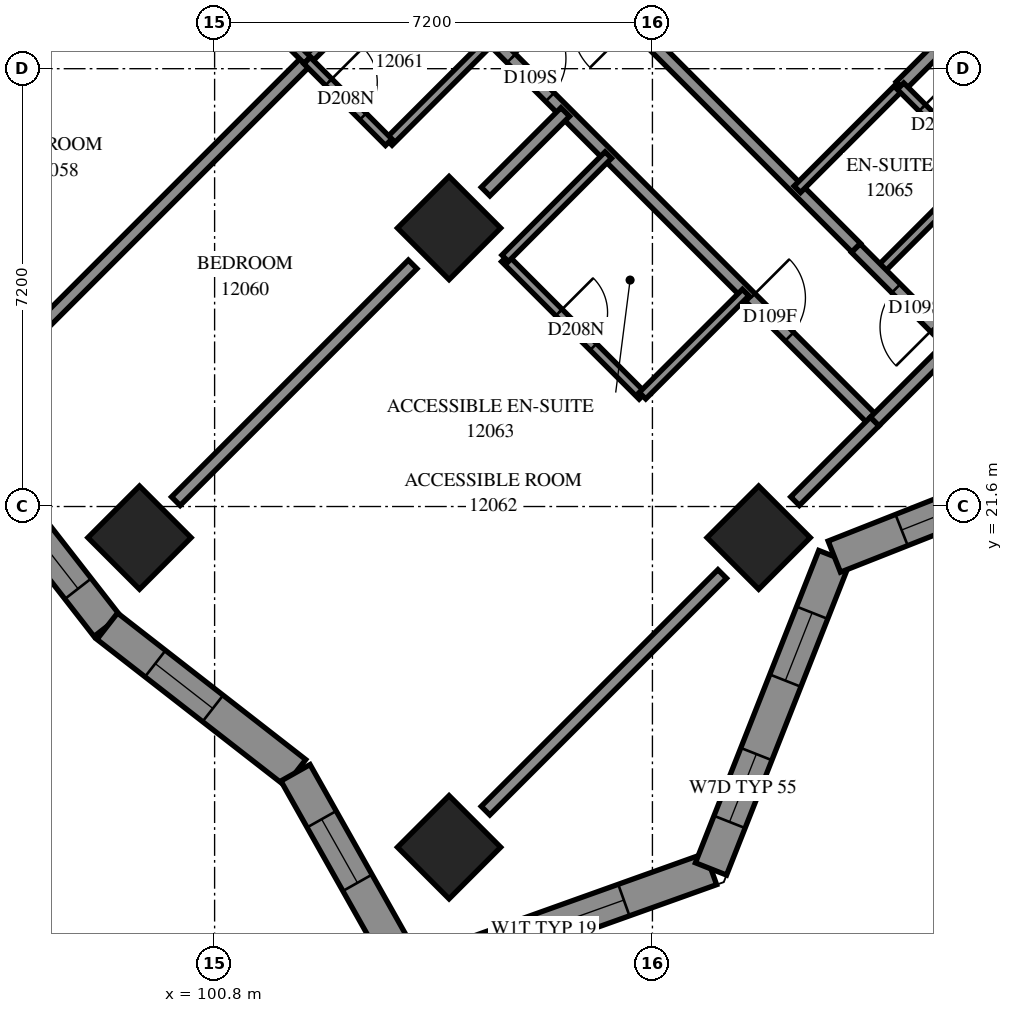
"""IFC4 building model, lengths in metres.
Left out: names, types, materials, properties, quantities, classifications, styles, units other than length and angle.
Written with IfcOpenShell. Run it as: python <this file> out.ifc"""

import sys

from ifc_helpers import new_model, si_unit, direction, frame, frame_2d, origin, origin_2d, place, context, subcontext, project, spatial, polyline, rectangle, outline, extrude, element, fill, save


model = new_model("IFC4")
c1 = context("Model", 3, precision=1e-05, world=origin(), true_north=direction((0.0, 1.0)))
c2 = subcontext(c1, "Body", "Model", "MODEL_VIEW")
j1 = project(units=[si_unit("LENGTHUNIT", "METRE"), si_unit("PLANEANGLEUNIT", "RADIAN")], contexts=[c1])
p1 = place(None, origin())
s1 = spatial("IfcSite", under=j1, at=p1, CompositionType="ELEMENT")
p2 = place(p1, origin())
s2 = spatial("IfcBuilding", under=s1, at=p2, CompositionType="ELEMENT")
p3 = place(p2, frame((0.0, 0.0, 47.4)))
s3 = spatial("IfcBuildingStorey", under=s2, at=p3, CompositionType="ELEMENT", Elevation=47.4)
for number, where, z_axis, x_axis in (
    (1, (104.656, 26.18, 0.0), (0.0, 0.0, 1.0), (0.707, -0.707, 0.0)),
    (2, (99.565, 21.088, 0.0), (0.0, 0.0, 1.0), (0.707, -0.707, 0.0)),
    (3, (109.747, 21.088, 0.0), (0.0, 0.0, 1.0), (0.707, -0.707, 0.0)),
    (4, (104.656, 15.997, 0.0), (0.0, 0.0, 1.0), (0.707, -0.707, 0.0)),
):
    element("IfcColumn", number, at=place(p3, frame(where, z_axis=z_axis, x_axis=x_axis)), inside=s3, PredefinedType="COLUMN", context=c2, shape_type="SweptSolid", body=[
        extrude(rectangle(XDim=1.2, YDim=1.2, at=origin_2d()), origin(), (0.0, 0.0, 1.0), 3.1),
    ])
p4 = place(p3, frame((104.016, 13.872, 0.0), z_axis=(0.0, 0.0, 1.0), x_axis=(0.9416441087, 0.3366101194, 0.0)))
e5 = element("IfcWall", 5, at=p4, inside=s3, PredefinedType="SOLIDWALL", context=c2, shape_type="SweptSolid", body=[
    extrude(outline(polyline([(-0.232, -0.275), (5.378, -0.275), (5.128, 0.275), (0.232, 0.275), (-0.232, -0.275)])), origin(), (0.0, 0.0, 1.0), 3.1),
])
p5 = place(p4, frame((0.931, 0.0, 0.5)))
e6 = element("IfcOpeningElement", 6, at=p5, cuts=e5, PredefinedType="OPENING", context=c2, shape_type="SweptSolid", body=[
    extrude(rectangle(XDim=2.8, YDim=2.45, at=frame_2d((1.4, 1.225))), frame((0.0, 0.285, 0.0), z_axis=(0.0, -1.0, 0.0), x_axis=(1.0, 0.0, 0.0)), (0.0, 0.0, 1.0), 0.57),
])
p6 = place(p3, frame((108.963, 15.64, 0.0), z_axis=(0.0, 0.0, 1.0), x_axis=(0.3672341559, 0.9301285259, 0.0)))
e7 = element("IfcWall", 7, at=p6, inside=s3, PredefinedType="SOLIDWALL", context=c2, shape_type="SweptSolid", body=[
    extrude(outline(polyline([(-0.125, -0.275), (5.402, -0.275), (5.641, 0.275), (0.125, 0.275), (-0.125, -0.275)])), origin(), (0.0, 0.0, 1.0), 3.1),
])
p7 = place(p6, frame((0.831, 0.0, 0.5)))
e8 = element("IfcOpeningElement", 8, at=p7, cuts=e7, PredefinedType="OPENING", context=c2, shape_type="SweptSolid", body=[
    extrude(rectangle(XDim=1.2, YDim=2.45, at=frame_2d((0.6, 1.225))), frame((0.0, 0.285, 0.0), z_axis=(0.0, -1.0, 0.0), x_axis=(1.0, 0.0, 0.0)), (0.0, 0.0, 1.0), 0.57),
])
p8 = place(p6, frame((3.329, 0.0, 0.5)))
e9 = element("IfcOpeningElement", 9, at=p8, cuts=e7, PredefinedType="OPENING", context=c2, shape_type="SweptSolid", body=[
    extrude(rectangle(XDim=1.2, YDim=2.45, at=frame_2d((0.6, 1.225))), frame((0.0, 0.285, 0.0), z_axis=(0.0, -1.0, 0.0), x_axis=(1.0, 0.0, 0.0)), (0.0, 0.0, 1.0), 0.57),
])
p9 = place(p3, frame((110.991, 20.776, 0.0), z_axis=(0.0, 0.0, 1.0), x_axis=(0.9301285259, 0.3672341559, 0.0)))
e10 = element("IfcWall", 10, at=p9, inside=s3, PredefinedType="SOLIDWALL", context=c2, shape_type="SweptSolid", body=[
    extrude(outline(polyline([(0.119, -0.275), (5.646, -0.275), (5.397, 0.275), (-0.119, 0.275), (0.119, -0.275)])), origin(), (0.0, 0.0, 1.0), 3.1),
])
p10 = place(p9, frame((1.19, 0.0, 0.5)))
e11 = element("IfcOpeningElement", 11, at=p10, cuts=e10, PredefinedType="OPENING", context=c2, shape_type="SweptSolid", body=[
    extrude(rectangle(XDim=2.8, YDim=2.45, at=frame_2d((1.4, 1.225))), frame((0.0, 0.285, 0.0), z_axis=(0.0, -1.0, 0.0), x_axis=(1.0, 0.0, 0.0)), (0.0, 0.0, 1.0), 0.57),
])
p11 = place(p3, frame((96.637, 22.711, 0.0), z_axis=(0.0, 0.0, 1.0), x_axis=(0.614334374, -0.7890458015, 0.0)))
e12 = element("IfcWall", 12, at=p11, inside=s3, PredefinedType="SOLIDWALL", context=c2, shape_type="SweptSolid", body=[
    extrude(outline(polyline([(0.034, -0.275), (3.937, -0.275), (3.868, 0.275), (-0.034, 0.275), (0.034, -0.275)])), origin(), (0.0, 0.0, 1.0), 3.1),
])
p12 = place(p11, frame((0.321, 0.0, 0.5)))
e13 = element("IfcOpeningElement", 13, at=p12, cuts=e12, PredefinedType="OPENING", context=c2, shape_type="SweptSolid", body=[
    extrude(rectangle(XDim=2.8, YDim=2.45, at=frame_2d((1.4, 1.225))), frame((0.0, 0.285, 0.0), z_axis=(0.0, -1.0, 0.0), x_axis=(1.0, 0.0, 0.0)), (0.0, 0.0, 1.0), 0.57),
])
p13 = place(p3, frame((99.034, 19.632, 0.0), z_axis=(0.0, 0.0, 1.0), x_axis=(0.7890391978, -0.6143428557, 0.0)))
e14 = element("IfcWall", 14, at=p13, inside=s3, PredefinedType="SOLIDWALL", context=c2, shape_type="SweptSolid", body=[
    extrude(outline(polyline([(-0.034, -0.275), (3.868, -0.275), (3.979, 0.275), (0.034, 0.275), (-0.034, -0.275)])), origin(), (0.0, 0.0, 1.0), 3.1),
])
p14 = place(p13, frame((1.001, 0.0, 0.5)))
e15 = element("IfcOpeningElement", 15, at=p14, cuts=e14, PredefinedType="OPENING", context=c2, shape_type="SweptSolid", body=[
    extrude(rectangle(XDim=1.2, YDim=2.45, at=frame_2d((0.6, 1.225))), frame((0.0, 0.285, 0.0), z_axis=(0.0, -1.0, 0.0), x_axis=(1.0, 0.0, 0.0)), (0.0, 0.0, 1.0), 0.57),
])
p15 = place(p3, frame((102.13, 17.221, 0.0), z_axis=(0.0, 0.0, 1.0), x_axis=(0.4907366579, -0.8713079436, 0.0)))
e16 = element("IfcWall", 16, at=p15, inside=s3, PredefinedType="SOLIDWALL", context=c2, shape_type="SweptSolid", body=[
    extrude(outline(polyline([(0.055, -0.275), (4.076, -0.275), (3.612, 0.275), (-0.055, 0.275), (0.055, -0.275)])), origin(), (0.0, 0.0, 1.0), 3.1),
])
p16 = place(p15, frame((0.877, 0.0, 0.5)))
e17 = element("IfcOpeningElement", 17, at=p16, cuts=e16, PredefinedType="OPENING", context=c2, shape_type="SweptSolid", body=[
    extrude(rectangle(XDim=1.2, YDim=2.45, at=frame_2d((0.6, 1.225))), frame((0.0, 0.285, 0.0), z_axis=(0.0, -1.0, 0.0), x_axis=(1.0, 0.0, 0.0)), (0.0, 0.0, 1.0), 0.57),
])
p17 = place(p3, frame((93.481, 41.167, 0.0), z_axis=(0.0, 0.0, 1.0), x_axis=(0.7071067812, -0.7071067812, 0.0)))
e18 = element("IfcWall", 18, at=p17, inside=s3, PredefinedType="PARTITIONING", context=c2, shape_type="SweptSolid", body=[
    extrude(rectangle(XDim=25.699, YDim=0.2, at=frame_2d((12.85, 0.0))), origin(), (0.0, 0.0, 1.0), 3.1),
])
p18 = place(p17, frame((2.8, 0.0, 0.0)))
e19 = element("IfcOpeningElement", 19, at=p18, cuts=e18, PredefinedType="OPENING", context=c2, shape_type="SweptSolid", body=[
    extrude(rectangle(XDim=0.9, YDim=2.1, at=frame_2d((0.45, 1.05))), frame((0.0, 0.11, 0.0), z_axis=(0.0, -1.0, 0.0), x_axis=(1.0, 0.0, 0.0)), (0.0, 0.0, 1.0), 0.22),
])
p19 = place(p17, frame((9.948, 0.0, 0.0)))
e20 = element("IfcOpeningElement", 20, at=p19, cuts=e18, PredefinedType="OPENING", context=c2, shape_type="SweptSolid", body=[
    extrude(rectangle(XDim=0.9, YDim=2.1, at=frame_2d((0.45, 1.05))), frame((0.0, 0.11, 0.0), z_axis=(0.0, -1.0, 0.0), x_axis=(1.0, 0.0, 0.0)), (0.0, 0.0, 1.0), 0.22),
])
p20 = place(p17, frame((11.7, 0.0, 0.0)))
e21 = element("IfcOpeningElement", 21, at=p20, cuts=e18, PredefinedType="OPENING", context=c2, shape_type="SweptSolid", body=[
    extrude(rectangle(XDim=0.9, YDim=2.1, at=frame_2d((0.45, 1.05))), frame((0.0, 0.11, 0.0), z_axis=(0.0, -1.0, 0.0), x_axis=(1.0, 0.0, 0.0)), (0.0, 0.0, 1.0), 0.22),
])
p21 = place(p17, frame((17.25, 0.0, 0.0)))
e22 = element("IfcOpeningElement", 22, at=p21, cuts=e18, PredefinedType="OPENING", context=c2, shape_type="SweptSolid", body=[
    extrude(rectangle(XDim=0.9, YDim=2.1, at=frame_2d((0.45, 1.05))), frame((0.0, 0.11, 0.0), z_axis=(0.0, -1.0, 0.0), x_axis=(1.0, 0.0, 0.0)), (0.0, 0.0, 1.0), 0.22),
])
p22 = place(p17, frame((22.82, 0.0, 0.0)))
e23 = element("IfcOpeningElement", 23, at=p22, cuts=e18, PredefinedType="OPENING", context=c2, shape_type="SweptSolid", body=[
    extrude(rectangle(XDim=0.9, YDim=2.1, at=frame_2d((0.45, 1.05))), frame((0.0, 0.11, 0.0), z_axis=(0.0, -1.0, 0.0), x_axis=(1.0, 0.0, 0.0)), (0.0, 0.0, 1.0), 0.22),
])
p23 = place(p3, frame((111.352, 25.855, 0.0), z_axis=(0.0, 0.0, 1.0), x_axis=(-0.7070418597, 0.7071716967, 0.0)))
e24 = element("IfcWall", 24, at=p23, inside=s3, PredefinedType="PARTITIONING", context=c2, shape_type="SweptSolid", body=[
    extrude(rectangle(XDim=13.864, YDim=0.2, at=frame_2d((6.932, 0.0))), origin(), (0.0, 0.0, 1.0), 3.1),
])
p24 = place(p23, frame((12.564, 0.0, 0.0)))
e25 = element("IfcOpeningElement", 25, at=p24, cuts=e24, PredefinedType="OPENING", context=c2, shape_type="SweptSolid", body=[
    extrude(rectangle(XDim=0.9, YDim=2.1, at=frame_2d((0.45, 1.05))), frame((0.0, 0.11, 0.0), z_axis=(0.0, -1.0, 0.0), x_axis=(1.0, 0.0, 0.0)), (0.0, 0.0, 1.0), 0.22),
])
p25 = place(p23, frame((5.19, 0.0, 0.0)))
e26 = element("IfcOpeningElement", 26, at=p25, cuts=e24, PredefinedType="OPENING", context=c2, shape_type="SweptSolid", body=[
    extrude(rectangle(XDim=1.0, YDim=2.1, at=frame_2d((0.5, 1.05))), frame((0.0, 0.11, 0.0), z_axis=(0.0, -1.0, 0.0), x_axis=(1.0, 0.0, 0.0)), (0.0, 0.0, 1.0), 0.22),
])
p26 = place(p3, frame((96.528, 23.144, 0.0), z_axis=(0.0, 0.0, 1.0), x_axis=(0.7071067812, 0.7071067812, 0.0)))
e27 = element("IfcWall", 27, at=p26, inside=s3, PredefinedType="PARTITIONING", context=c2, shape_type="SweptSolid", body=[
    extrude(rectangle(XDim=8.195, YDim=0.2, at=frame_2d((4.098, 0.0))), origin(), (0.0, 0.0, 1.0), 3.1),
])
p27 = place(p3, frame((100.162, 21.688, 0.0), z_axis=(0.0, 0.0, 1.0), x_axis=(0.7071067812, 0.7071067812, 0.0)))
e28 = element("IfcWall", 28, at=p27, inside=s3, PredefinedType="PARTITIONING", context=c2, shape_type="SweptSolid", body=[
    extrude(rectangle(XDim=5.507, YDim=0.2, at=frame_2d((2.753, 0.0))), origin(), (0.0, 0.0, 1.0), 3.1),
])
p28 = place(p3, frame((105.255, 16.599, 0.0), z_axis=(0.0, 0.0, 1.0), x_axis=(0.7071067812, 0.7071067812, 0.0)))
e29 = element("IfcWall", 29, at=p28, inside=s3, PredefinedType="PARTITIONING", context=c2, shape_type="SweptSolid", body=[
    extrude(rectangle(XDim=5.504, YDim=0.2, at=frame_2d((2.752, 0.0))), origin(), (0.0, 0.0, 1.0), 2.6),
])
p29 = place(p3, frame((95.073, 26.781, 0.0), z_axis=(0.0, 0.0, 1.0), x_axis=(0.7071067812, 0.7071067812, 0.0)))
e30 = element("IfcWall", 30, at=p29, inside=s3, PredefinedType="PARTITIONING", context=c2, shape_type="SweptSolid", body=[
    extrude(rectangle(XDim=5.501, YDim=0.2, at=frame_2d((2.751, 0.0))), origin(), (0.0, 0.0, 1.0), 3.1),
])
p30 = place(p3, frame((112.079, 28.513, 0.0), z_axis=(0.0, 0.0, 1.0), x_axis=(0.7071067812, 0.7071067812, 0.0)))
e31 = element("IfcWall", 31, at=p30, inside=s3, PredefinedType="PARTITIONING", context=c2, shape_type="SweptSolid", body=[
    extrude(rectangle(XDim=3.351, YDim=0.2, at=frame_2d((1.675, 0.0))), origin(), (0.0, 0.0, 1.0), 3.1),
])
p31 = place(p3, frame((105.573, 25.681, 0.0), z_axis=(0.0, 0.0, 1.0), x_axis=(0.7071067812, -0.7071067812, 0.0)))
e32 = element("IfcWall", 32, at=p31, inside=s3, PredefinedType="PARTITIONING", context=c2, shape_type="SweptSolid", body=[
    extrude(rectangle(XDim=3.199, YDim=0.15, at=frame_2d((1.599, 0.0))), origin(), (0.0, 0.0, 1.0), 3.1),
])
p32 = place(p31, frame((1.258, 0.0, 0.0)))
e33 = element("IfcOpeningElement", 33, at=p32, cuts=e32, PredefinedType="OPENING", context=c2, shape_type="SweptSolid", body=[
    extrude(rectangle(XDim=0.8, YDim=2.1, at=frame_2d((0.4, 1.05))), frame((0.0, 0.085, 0.0), z_axis=(0.0, -1.0, 0.0), x_axis=(1.0, 0.0, 0.0)), (0.0, 0.0, 1.0), 0.17),
])
p33 = place(p3, frame((111.725, 25.473, 0.0), z_axis=(0.0, 0.0, 1.0), x_axis=(0.7071067812, 0.7071067812, 0.0)))
e34 = element("IfcWall", 34, at=p33, inside=s3, PredefinedType="PARTITIONING", context=c2, shape_type="SweptSolid", body=[
    extrude(rectangle(XDim=2.401, YDim=0.15, at=frame_2d((1.201, 0.0))), origin(), (0.0, 0.0, 1.0), 3.1),
])
p34 = place(p3, frame((105.578, 25.682, 0.0), z_axis=(0.0, 0.0, 1.0), x_axis=(0.706689978, 0.7075233388, 0.0)))
e35 = element("IfcWall", 35, at=p34, inside=s3, PredefinedType="PARTITIONING", context=c2, shape_type="SweptSolid", body=[
    extrude(rectangle(XDim=2.4, YDim=0.15, at=frame_2d((1.2, 0.0))), origin(), (0.0, 0.0, 1.0), 3.1),
])
for number, where, z_axis, x_axis in (
    (36, (110.383, 26.817, 0.0), (0.0, 0.0, 1.0), (0.707, 0.707, 0.0)),
    (37, (102.323, 28.939, 0.0), (0.0, 0.0, 1.0), (0.707, 0.707, 0.0)),
    (38, (103.665, 27.595, 0.0), (0.0, 0.0, 1.0), (0.707, 0.707, 0.0)),
    (39, (107.837, 23.423, 0.0), (0.0, 0.0, 1.0), (0.707, 0.707, 0.0)),
):
    element("IfcWall", number, at=place(p3, frame(where, z_axis=z_axis, x_axis=x_axis)), inside=s3, PredefinedType="PARTITIONING", context=c2, shape_type="SweptSolid", body=[
        extrude(rectangle(XDim=2.398, YDim=0.15, at=frame_2d((1.199, 0.0))), origin(), (0.0, 0.0, 1.0), 3.1),
    ])
p35 = place(p3, frame((112.925, 24.267, 0.0), z_axis=(0.0, 0.0, 1.0), x_axis=(-0.7068383786, 0.707375082, 0.0)))
e40 = element("IfcWall", 40, at=p35, inside=s3, PredefinedType="PARTITIONING", context=c2, shape_type="SweptSolid", body=[
    extrude(rectangle(XDim=2.236, YDim=0.2, at=frame_2d((1.118, 0.0))), origin(), (0.0, 0.0, 1.0), 3.1),
])
p36 = place(p35, frame((0.4, 0.0, 0.0)))
e41 = element("IfcOpeningElement", 41, at=p36, cuts=e40, PredefinedType="OPENING", context=c2, shape_type="SweptSolid", body=[
    extrude(rectangle(XDim=0.9, YDim=2.1, at=frame_2d((0.45, 1.05))), frame((0.0, 0.11, 0.0), z_axis=(0.0, -1.0, 0.0), x_axis=(1.0, 0.0, 0.0)), (0.0, 0.0, 1.0), 0.22),
])
p37 = place(p3, frame((100.981, 30.283, 0.0), z_axis=(0.0, 0.0, 1.0), x_axis=(0.7076330979, -0.7065800724, 0.0)))
e42 = element("IfcWall", 42, at=p37, inside=s3, PredefinedType="PARTITIONING", context=c2, shape_type="SweptSolid", body=[
    extrude(rectangle(XDim=1.899, YDim=0.15, at=frame_2d((0.95, 0.0))), origin(), (0.0, 0.0, 1.0), 3.1),
])
p38 = place(p37, frame((0.493, 0.0, 0.0)))
e43 = element("IfcOpeningElement", 43, at=p38, cuts=e42, PredefinedType="OPENING", context=c2, shape_type="SweptSolid", body=[
    extrude(rectangle(XDim=0.8, YDim=2.1, at=frame_2d((0.4, 1.05))), frame((0.0, 0.085, 0.0), z_axis=(0.0, -1.0, 0.0), x_axis=(1.0, 0.0, 0.0)), (0.0, 0.0, 1.0), 0.17),
])
p39 = place(p3, frame((102.321, 28.935, 0.0), z_axis=(0.0, 0.0, 1.0), x_axis=(0.7065800724, -0.7076330979, 0.0)))
e44 = element("IfcWall", 44, at=p39, inside=s3, PredefinedType="PARTITIONING", context=c2, shape_type="SweptSolid", body=[
    extrude(rectangle(XDim=1.899, YDim=0.15, at=frame_2d((0.95, 0.0))), origin(), (0.0, 0.0, 1.0), 3.1),
])
p40 = place(p39, frame((0.501, 0.0, 0.0)))
e45 = element("IfcOpeningElement", 45, at=p40, cuts=e44, PredefinedType="OPENING", context=c2, shape_type="SweptSolid", body=[
    extrude(rectangle(XDim=0.8, YDim=2.1, at=frame_2d((0.4, 1.05))), frame((0.0, 0.085, 0.0), z_axis=(0.0, -1.0, 0.0), x_axis=(1.0, 0.0, 0.0)), (0.0, 0.0, 1.0), 0.17),
])
p41 = place(p3, frame((112.08, 28.512, 0.0), z_axis=(0.0, 0.0, 1.0), x_axis=(0.7076330979, -0.7065800724, 0.0)))
e46 = element("IfcWall", 46, at=p41, inside=s3, PredefinedType="PARTITIONING", context=c2, shape_type="SweptSolid", body=[
    extrude(rectangle(XDim=1.899, YDim=0.15, at=frame_2d((0.95, 0.0))), origin(), (0.0, 0.0, 1.0), 3.1),
])
p42 = place(p41, frame((0.505, 0.0, 0.0)))
e47 = element("IfcOpeningElement", 47, at=p42, cuts=e46, PredefinedType="OPENING", context=c2, shape_type="SweptSolid", body=[
    extrude(rectangle(XDim=0.8, YDim=2.1, at=frame_2d((0.4, 1.05))), frame((0.0, 0.085, 0.0), z_axis=(0.0, -1.0, 0.0), x_axis=(1.0, 0.0, 0.0)), (0.0, 0.0, 1.0), 0.17),
])
p43 = place(p3, frame((110.346, 21.689, 0.0), z_axis=(0.0, 0.0, 1.0), x_axis=(0.7071067812, 0.7071067812, 0.0)))
e48 = element("IfcWall", 48, at=p43, inside=s3, PredefinedType="PARTITIONING", context=c2, shape_type="SweptSolid", body=[
    extrude(rectangle(XDim=1.853, YDim=0.2, at=frame_2d((0.926, 0.0))), origin(), (0.0, 0.0, 1.0), 2.6),
])
p44 = place(p3, frame((105.256, 26.78, 0.0), z_axis=(0.0, 0.0, 1.0), x_axis=(0.7076467632, 0.7065663865, 0.0)))
e49 = element("IfcWall", 49, at=p44, inside=s3, PredefinedType="PARTITIONING", context=c2, shape_type="SweptSolid", body=[
    extrude(rectangle(XDim=1.851, YDim=0.2, at=frame_2d((0.926, 0.0))), origin(), (0.0, 0.0, 1.0), 3.1),
])
p45 = place(p3, frame((111.656, 22.998, 0.0), z_axis=(0.0, 0.0, 1.0), x_axis=(0.7071067812, 0.7071067812, 0.0)))
e50 = element("IfcWall", 50, at=p45, inside=s3, PredefinedType="PARTITIONING", context=c2, shape_type="SweptSolid", body=[
    extrude(rectangle(XDim=1.799, YDim=0.2, at=frame_2d((0.899, 0.0))), origin(), (0.0, 0.0, 1.0), 2.6),
])
p46 = place(p5, origin())
e51 = element("IfcWindow", 51, at=p46, inside=s3, PartitioningType="SINGLE_PANEL", PredefinedType="WINDOW", context=c2, shape_type="SweptSolid", body=[
    extrude(rectangle(XDim=2.8, YDim=2.45, at=frame_2d((1.4, 1.225))), frame((0.0, 0.155, 0.0), z_axis=(0.0, -1.0, 0.0), x_axis=(1.0, 0.0, 0.0)), (0.0, 0.0, 1.0), 0.06),
])
fill(e6, e51)
p47 = place(p7, origin())
e52 = element("IfcWindow", 52, at=p47, inside=s3, PartitioningType="SINGLE_PANEL", PredefinedType="WINDOW", context=c2, shape_type="SweptSolid", body=[
    extrude(rectangle(XDim=1.2, YDim=2.45, at=frame_2d((0.6, 1.225))), frame((0.0, 0.155, 0.0), z_axis=(0.0, -1.0, 0.0), x_axis=(1.0, 0.0, 0.0)), (0.0, 0.0, 1.0), 0.06),
])
fill(e8, e52)
p48 = place(p8, origin())
e53 = element("IfcWindow", 53, at=p48, inside=s3, PartitioningType="SINGLE_PANEL", PredefinedType="WINDOW", context=c2, shape_type="SweptSolid", body=[
    extrude(rectangle(XDim=1.2, YDim=2.45, at=frame_2d((0.6, 1.225))), frame((0.0, 0.155, 0.0), z_axis=(0.0, -1.0, 0.0), x_axis=(1.0, 0.0, 0.0)), (0.0, 0.0, 1.0), 0.06),
])
fill(e9, e53)
p49 = place(p10, origin())
e54 = element("IfcWindow", 54, at=p49, inside=s3, PartitioningType="SINGLE_PANEL", PredefinedType="WINDOW", context=c2, shape_type="SweptSolid", body=[
    extrude(rectangle(XDim=2.8, YDim=2.45, at=frame_2d((1.4, 1.225))), frame((0.0, 0.155, 0.0), z_axis=(0.0, -1.0, 0.0), x_axis=(1.0, 0.0, 0.0)), (0.0, 0.0, 1.0), 0.06),
])
fill(e11, e54)
p50 = place(p12, origin())
e55 = element("IfcWindow", 55, at=p50, inside=s3, PartitioningType="SINGLE_PANEL", PredefinedType="WINDOW", context=c2, shape_type="SweptSolid", body=[
    extrude(rectangle(XDim=2.8, YDim=2.45, at=frame_2d((1.4, 1.225))), frame((0.0, 0.155, 0.0), z_axis=(0.0, -1.0, 0.0), x_axis=(1.0, 0.0, 0.0)), (0.0, 0.0, 1.0), 0.06),
])
fill(e13, e55)
p51 = place(p14, origin())
e56 = element("IfcWindow", 56, at=p51, inside=s3, PartitioningType="SINGLE_PANEL", PredefinedType="WINDOW", context=c2, shape_type="SweptSolid", body=[
    extrude(rectangle(XDim=1.2, YDim=2.45, at=frame_2d((0.6, 1.225))), frame((0.0, 0.155, 0.0), z_axis=(0.0, -1.0, 0.0), x_axis=(1.0, 0.0, 0.0)), (0.0, 0.0, 1.0), 0.06),
])
fill(e15, e56)
p52 = place(p16, origin())
e57 = element("IfcWindow", 57, at=p52, inside=s3, PartitioningType="SINGLE_PANEL", PredefinedType="WINDOW", context=c2, shape_type="SweptSolid", body=[
    extrude(rectangle(XDim=1.2, YDim=2.45, at=frame_2d((0.6, 1.225))), frame((0.0, 0.155, 0.0), z_axis=(0.0, -1.0, 0.0), x_axis=(1.0, 0.0, 0.0)), (0.0, 0.0, 1.0), 0.06),
])
fill(e17, e57)
p53 = place(p21, origin())
e58 = element("IfcDoor", 58, at=p53, inside=s3, OperationType="SINGLE_SWING_LEFT", PredefinedType="DOOR", context=c2, shape_type="SweptSolid", body=[
    extrude(rectangle(XDim=0.9, YDim=2.1, at=frame_2d((0.45, 1.05))), frame((0.0, 0.025, 0.0), z_axis=(0.0, -1.0, 0.0), x_axis=(1.0, 0.0, 0.0)), (0.0, 0.0, 1.0), 0.05),
])
fill(e22, e58)
p54 = place(p40, origin())
e59 = element("IfcDoor", 59, at=p54, inside=s3, OperationType="SINGLE_SWING_RIGHT", PredefinedType="DOOR", context=c2, shape_type="SweptSolid", body=[
    extrude(rectangle(XDim=0.8, YDim=2.1, at=frame_2d((0.4, 1.05))), frame((0.0, 0.025, 0.0), z_axis=(0.0, -1.0, 0.0), x_axis=(1.0, 0.0, 0.0)), (0.0, 0.0, 1.0), 0.05),
])
fill(e45, e59)
p55 = place(p22, origin())
e60 = element("IfcDoor", 60, at=p55, inside=s3, OperationType="SINGLE_SWING_RIGHT", PredefinedType="DOOR", context=c2, shape_type="SweptSolid", body=[
    extrude(rectangle(XDim=0.9, YDim=2.1, at=frame_2d((0.45, 1.05))), frame((0.0, 0.025, 0.0), z_axis=(0.0, -1.0, 0.0), x_axis=(1.0, 0.0, 0.0)), (0.0, 0.0, 1.0), 0.05),
])
fill(e23, e60)
p56 = place(p32, origin())
e61 = element("IfcDoor", 61, at=p56, inside=s3, OperationType="SINGLE_SWING_RIGHT", PredefinedType="DOOR", context=c2, shape_type="SweptSolid", body=[
    extrude(rectangle(XDim=0.8, YDim=2.1, at=frame_2d((0.4, 1.05))), frame((0.0, 0.025, 0.0), z_axis=(0.0, -1.0, 0.0), x_axis=(1.0, 0.0, 0.0)), (0.0, 0.0, 1.0), 0.05),
])
fill(e33, e61)
p57 = place(p36, origin())
e62 = element("IfcDoor", 62, at=p57, inside=s3, OperationType="SINGLE_SWING_RIGHT", PredefinedType="DOOR", context=c2, shape_type="SweptSolid", body=[
    extrude(rectangle(XDim=0.9, YDim=2.1, at=frame_2d((0.45, 1.05))), frame((0.0, 0.025, 0.0), z_axis=(0.0, -1.0, 0.0), x_axis=(1.0, 0.0, 0.0)), (0.0, 0.0, 1.0), 0.05),
])
fill(e41, e62)
p58 = place(p42, origin())
e63 = element("IfcDoor", 63, at=p58, inside=s3, OperationType="SINGLE_SWING_RIGHT", PredefinedType="DOOR", context=c2, shape_type="SweptSolid", body=[
    extrude(rectangle(XDim=0.8, YDim=2.1, at=frame_2d((0.4, 1.05))), frame((0.0, 0.025, 0.0), z_axis=(0.0, -1.0, 0.0), x_axis=(1.0, 0.0, 0.0)), (0.0, 0.0, 1.0), 0.05),
])
fill(e47, e63)
save(model, sys.argv[1])
